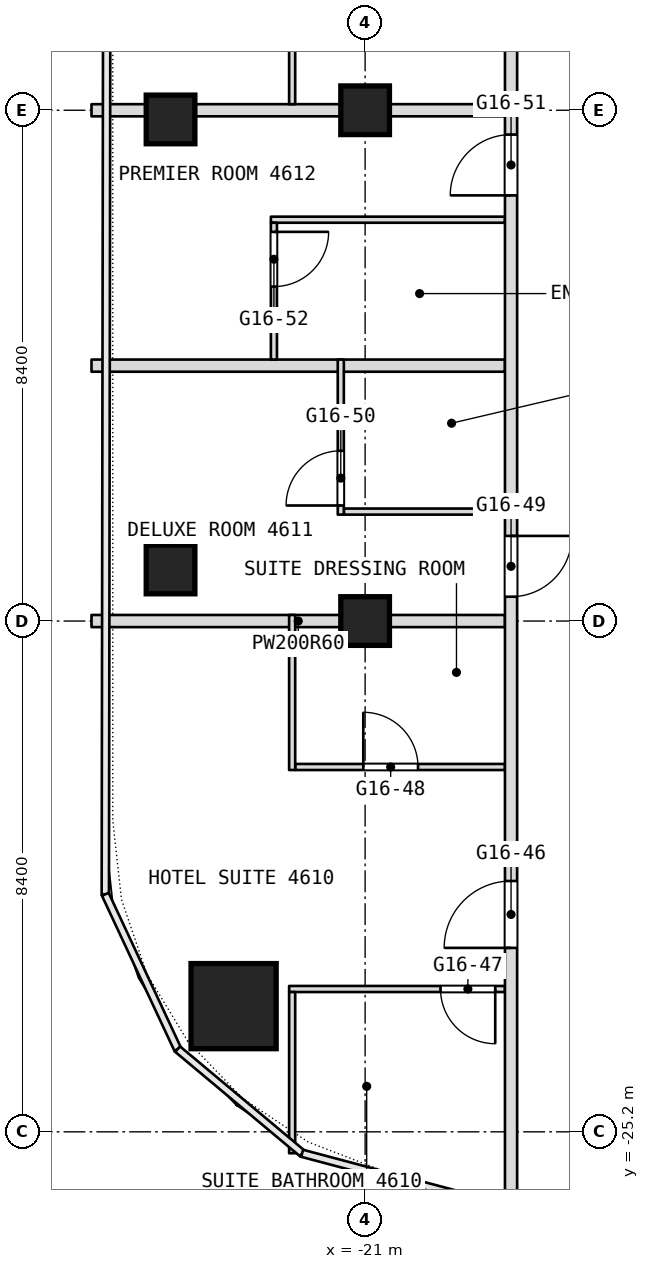
"""IFC4 building model, lengths in metres.
Left out: names, types, materials, properties, quantities, classifications, styles, units other than length and angle.
Written with IfcOpenShell. Run it as: python <this file> out.ifc"""

import sys

from ifc_helpers import new_model, si_unit, direction, frame, frame_2d, origin, origin_2d, place, context, subcontext, project, spatial, rectangle, extrude, element, fill, save


model = new_model("IFC4")
c1 = context("Model", 3, precision=1e-05, world=origin(), true_north=direction((0.0, 1.0)))
c2 = subcontext(c1, "Body", "Model", "MODEL_VIEW")
j1 = project(units=[si_unit("LENGTHUNIT", "METRE"), si_unit("PLANEANGLEUNIT", "RADIAN")], contexts=[c1])
p1 = place(None, origin())
s1 = spatial("IfcSite", under=j1, at=p1, CompositionType="ELEMENT")
p2 = place(p1, origin())
s2 = spatial("IfcBuilding", under=s1, at=p2, CompositionType="ELEMENT")
p3 = place(p2, frame((0.0, 0.0, 202.1)))
s3 = spatial("IfcBuildingStorey", under=s2, at=p3, CompositionType="ELEMENT", Elevation=202.1)
p4 = place(p3, frame((-23.163, -23.133, 0.0), z_axis=(0.0, 0.0, 1.0), x_axis=(1.0, 0.0, 0.0)))
e1 = element("IfcColumn", 1, at=p4, inside=s3, PredefinedType="COLUMN", context=c2, shape_type="SweptSolid", body=[
    extrude(rectangle(XDim=1.4, YDim=1.4, at=origin_2d()), origin(), (0.0, 0.0, 1.0), 3.6),
])
for number, where, z_axis, x_axis in (
    (2, (-21.0, -16.8, 0.0), (0.0, 0.0, 1.0), (1.0, 0.0, 0.0)),
    (3, (-21.0, -8.4, 0.0), (0.0, 0.0, 1.0), (1.0, 0.0, 0.0)),
    (4, (-24.2, -15.952, 0.0), (0.0, 0.0, 1.0), (1.0, 0.0, 0.0)),
    (5, (-24.2, -8.551, 0.0), (0.0, 0.0, 1.0), (1.0, 0.0, 0.0)),
):
    element("IfcColumn", number, at=place(p3, frame(where, z_axis=z_axis, x_axis=x_axis)), inside=s3, PredefinedType="COLUMN", context=c2, shape_type="SweptSolid", body=[
        extrude(rectangle(XDim=0.8, YDim=0.8, at=origin_2d()), origin(), (0.0, 0.0, 1.0), 3.6),
    ])
p5 = place(p3, frame((-22.25, -22.851, 0.0), z_axis=(0.0, 0.0, 1.0), x_axis=(1.0, 0.0, 0.0)))
e6 = element("IfcWall", 6, at=p5, inside=s3, PredefinedType="PARTITIONING", context=c2, shape_type="SweptSolid", body=[
    extrude(rectangle(XDim=3.55, YDim=0.1, at=frame_2d((1.775, 0.0))), origin(), (0.0, 0.0, 1.0), 3.34),
])
p6 = place(p5, frame((2.49, 0.0, 0.0)))
e7 = element("IfcOpeningElement", 7, at=p6, cuts=e6, PredefinedType="OPENING", context=c2, shape_type="SweptSolid", body=[
    extrude(rectangle(XDim=0.9, YDim=2.1, at=frame_2d((0.45, 1.05))), frame((0.0, 0.05, 0.0), z_axis=(0.0, -1.0, 0.0), x_axis=(1.0, 0.0, 0.0)), (0.0, 0.0, 1.0), 0.1),
])
p7 = place(p3, frame((-22.15, -19.2, 0.0), z_axis=(0.0, 0.0, 1.0), x_axis=(1.0, 0.0, 0.0)))
e8 = element("IfcWall", 8, at=p7, inside=s3, PredefinedType="PARTITIONING", context=c2, shape_type="SweptSolid", body=[
    extrude(rectangle(XDim=3.45, YDim=0.1, at=frame_2d((1.725, 0.0))), origin(), (0.0, 0.0, 1.0), 3.34),
])
p8 = place(p7, frame((1.12, 0.0, 0.0)))
e9 = element("IfcOpeningElement", 9, at=p8, cuts=e8, PredefinedType="OPENING", context=c2, shape_type="SweptSolid", body=[
    extrude(rectangle(XDim=0.9, YDim=2.1, at=frame_2d((0.45, 1.05))), frame((0.0, 0.05, 0.0), z_axis=(0.0, -1.0, 0.0), x_axis=(1.0, 0.0, 0.0)), (0.0, 0.0, 1.0), 0.1),
])
p9 = place(p3, frame((-25.5, -16.8, 0.0), z_axis=(0.0, 0.0, 1.0), x_axis=(1.0, 0.0, 0.0)))
e10 = element("IfcWall", 10, at=p9, inside=s3, PredefinedType="PARTITIONING", context=c2, shape_type="SweptSolid", body=[
    extrude(rectangle(XDim=6.8, YDim=0.2, at=frame_2d((3.4, 0.0))), origin(), (0.0, 0.0, 1.0), 2.94),
])
p10 = place(p3, frame((-21.35, -15.0, 0.0), z_axis=(0.0, 0.0, 1.0), x_axis=(1.0, 0.0, 0.0)))
e11 = element("IfcWall", 11, at=p10, inside=s3, PredefinedType="PARTITIONING", context=c2, shape_type="SweptSolid", body=[
    extrude(rectangle(XDim=2.65, YDim=0.1, at=frame_2d((1.325, 0.0))), origin(), (0.0, 0.0, 1.0), 3.34),
])
p11 = place(p3, frame((-25.5, -12.6, 0.0), z_axis=(0.0, 0.0, 1.0), x_axis=(1.0, 0.0, 0.0)))
e12 = element("IfcWall", 12, at=p11, inside=s3, PredefinedType="PARTITIONING", context=c2, shape_type="SweptSolid", body=[
    extrude(rectangle(XDim=6.8, YDim=0.2, at=frame_2d((3.4, 0.0))), origin(), (0.0, 0.0, 1.0), 3.34),
])
p12 = place(p3, frame((-22.55, -10.2, 0.0), z_axis=(0.0, 0.0, 1.0), x_axis=(1.0, 0.0, 0.0)))
e13 = element("IfcWall", 13, at=p12, inside=s3, PredefinedType="PARTITIONING", context=c2, shape_type="SweptSolid", body=[
    extrude(rectangle(XDim=3.85, YDim=0.1, at=frame_2d((1.925, 0.0))), origin(), (0.0, 0.0, 1.0), 3.34),
])
p13 = place(p3, frame((-25.5, -8.4, 0.0), z_axis=(0.0, 0.0, 1.0), x_axis=(1.0, 0.0, 0.0)))
e14 = element("IfcWall", 14, at=p13, inside=s3, PredefinedType="PARTITIONING", context=c2, shape_type="SweptSolid", body=[
    extrude(rectangle(XDim=6.8, YDim=0.2, at=frame_2d((3.4, 0.0))), origin(), (0.0, 0.0, 1.0), 2.94),
])
p14 = place(p3, frame((-18.6, -26.751, 0.0), z_axis=(0.0, 0.0, 1.0), x_axis=(0.0, 1.0, 0.0)))
e15 = element("IfcWall", 15, at=p14, inside=s3, PredefinedType="PARTITIONING", context=c2, shape_type="SweptSolid", body=[
    extrude(rectangle(XDim=49.091, YDim=0.2, at=frame_2d((24.545, 0.0))), origin(), (0.0, 0.0, 1.0), 3.34),
])
p15 = place(p14, frame((4.576, 0.0, 0.0)))
e16 = element("IfcOpeningElement", 16, at=p15, cuts=e15, PredefinedType="OPENING", context=c2, shape_type="SweptSolid", body=[
    extrude(rectangle(XDim=1.1, YDim=2.1, at=frame_2d((0.55, 1.05))), frame((0.0, 0.1, 0.0), z_axis=(0.0, -1.0, 0.0), x_axis=(1.0, 0.0, 0.0)), (0.0, 0.0, 1.0), 0.2),
])
p16 = place(p14, frame((10.351, 0.0, 0.0)))
e17 = element("IfcOpeningElement", 17, at=p16, cuts=e15, PredefinedType="OPENING", context=c2, shape_type="SweptSolid", body=[
    extrude(rectangle(XDim=1.0, YDim=2.1, at=frame_2d((0.5, 1.05))), frame((0.0, 0.1, 0.0), z_axis=(0.0, -1.0, 0.0), x_axis=(1.0, 0.0, 0.0)), (0.0, 0.0, 1.0), 0.2),
])
p17 = place(p14, frame((16.951, 0.0, 0.0)))
e18 = element("IfcOpeningElement", 18, at=p17, cuts=e15, PredefinedType="OPENING", context=c2, shape_type="SweptSolid", body=[
    extrude(rectangle(XDim=1.0, YDim=2.1, at=frame_2d((0.5, 1.05))), frame((0.0, 0.1, 0.0), z_axis=(0.0, -1.0, 0.0), x_axis=(1.0, 0.0, 0.0)), (0.0, 0.0, 1.0), 0.2),
])
p18 = place(p14, frame((22.051, 0.0, 0.0)))
e19 = element("IfcOpeningElement", 19, at=p18, cuts=e15, PredefinedType="OPENING", context=c2, shape_type="SweptSolid", body=[
    extrude(rectangle(XDim=1.1, YDim=2.1, at=frame_2d((0.55, 1.05))), frame((0.0, 0.1, 0.0), z_axis=(0.0, -1.0, 0.0), x_axis=(1.0, 0.0, 0.0)), (0.0, 0.0, 1.0), 0.2),
])
p19 = place(p14, frame((30.351, 0.0, 0.0)))
e20 = element("IfcOpeningElement", 20, at=p19, cuts=e15, PredefinedType="OPENING", context=c2, shape_type="SweptSolid", body=[
    extrude(rectangle(XDim=1.1, YDim=2.1, at=frame_2d((0.55, 1.05))), frame((0.0, 0.1, 0.0), z_axis=(0.0, -1.0, 0.0), x_axis=(1.0, 0.0, 0.0)), (0.0, 0.0, 1.0), 0.2),
])
p20 = place(p14, frame((40.901, 0.0, 0.0)))
e21 = element("IfcOpeningElement", 21, at=p20, cuts=e15, PredefinedType="OPENING", context=c2, shape_type="SweptSolid", body=[
    extrude(rectangle(XDim=1.1, YDim=2.1, at=frame_2d((0.55, 1.05))), frame((0.0, 0.1, 0.0), z_axis=(0.0, -1.0, 0.0), x_axis=(1.0, 0.0, 0.0)), (0.0, 0.0, 1.0), 0.2),
])
p21 = place(p14, frame((44.051, 0.0, 0.0)))
e22 = element("IfcOpeningElement", 22, at=p21, cuts=e15, PredefinedType="OPENING", context=c2, shape_type="SweptSolid", body=[
    extrude(rectangle(XDim=1.0, YDim=2.1, at=frame_2d((0.5, 1.05))), frame((0.0, 0.1, 0.0), z_axis=(0.0, -1.0, 0.0), x_axis=(1.0, 0.0, 0.0)), (0.0, 0.0, 1.0), 0.2),
])
p22 = place(p3, frame((-21.4, -15.05, 0.0), z_axis=(0.0, 0.0, 1.0), x_axis=(0.0, 1.0, 0.0)))
e23 = element("IfcWall", 23, at=p22, inside=s3, PredefinedType="PARTITIONING", context=c2, shape_type="SweptSolid", body=[
    extrude(rectangle(XDim=2.55, YDim=0.1, at=frame_2d((1.275, 0.0))), origin(), (0.0, 0.0, 1.0), 3.34),
])
p23 = place(p22, frame((0.15, 0.0, 0.0)))
e24 = element("IfcOpeningElement", 24, at=p23, cuts=e23, PredefinedType="OPENING", context=c2, shape_type="SweptSolid", body=[
    extrude(rectangle(XDim=0.9, YDim=2.1, at=frame_2d((0.45, 1.05))), frame((0.0, 0.05, 0.0), z_axis=(0.0, -1.0, 0.0), x_axis=(1.0, 0.0, 0.0)), (0.0, 0.0, 1.0), 0.1),
])
p24 = place(p3, frame((-22.2, -25.552, 0.0), z_axis=(0.0, 0.0, 1.0), x_axis=(0.0, 1.0, 0.0)))
e25 = element("IfcWall", 25, at=p24, inside=s3, PredefinedType="PARTITIONING", context=c2, shape_type="SweptSolid", body=[
    extrude(rectangle(XDim=2.651, YDim=0.1, at=frame_2d((1.326, 0.0))), origin(), (0.0, 0.0, 1.0), 3.34),
])
p25 = place(p3, frame((-22.2, -19.25, 0.0), z_axis=(0.0, 0.0, 1.0), x_axis=(0.0, 1.0, 0.0)))
e26 = element("IfcWall", 26, at=p25, inside=s3, PredefinedType="PARTITIONING", context=c2, shape_type="SweptSolid", body=[
    extrude(rectangle(XDim=2.55, YDim=0.1, at=frame_2d((1.275, 0.0))), origin(), (0.0, 0.0, 1.0), 3.34),
])
p26 = place(p3, frame((-22.2, -8.3, 0.0), z_axis=(0.0, 0.0, 1.0), x_axis=(0.0, 1.0, 0.0)))
e27 = element("IfcWall", 27, at=p26, inside=s3, PredefinedType="PARTITIONING", context=c2, shape_type="SweptSolid", body=[
    extrude(rectangle(XDim=3.45, YDim=0.1, at=frame_2d((1.725, 0.0))), origin(), (0.0, 0.0, 1.0), 3.34),
])
p27 = place(p26, frame((2.4, 0.0, 0.0)))
e28 = element("IfcOpeningElement", 28, at=p27, cuts=e27, PredefinedType="OPENING", context=c2, shape_type="SweptSolid", body=[
    extrude(rectangle(XDim=0.9, YDim=2.1, at=frame_2d((0.45, 1.05))), frame((0.0, 0.05, 0.0), z_axis=(0.0, -1.0, 0.0), x_axis=(1.0, 0.0, 0.0)), (0.0, 0.0, 1.0), 0.1),
])
p28 = place(p3, frame((-22.5, -12.5, 0.0), z_axis=(0.0, 0.0, 1.0), x_axis=(0.0, 1.0, 0.0)))
e29 = element("IfcWall", 29, at=p28, inside=s3, PredefinedType="PARTITIONING", context=c2, shape_type="SweptSolid", body=[
    extrude(rectangle(XDim=2.25, YDim=0.1, at=frame_2d((1.125, 0.0))), origin(), (0.0, 0.0, 1.0), 3.34),
])
p29 = place(p28, frame((1.2, 0.0, 0.0)))
e30 = element("IfcOpeningElement", 30, at=p29, cuts=e29, PredefinedType="OPENING", context=c2, shape_type="SweptSolid", body=[
    extrude(rectangle(XDim=0.9, YDim=2.1, at=frame_2d((0.45, 1.05))), frame((0.0, 0.05, 0.0), z_axis=(0.0, -1.0, 0.0), x_axis=(1.0, 0.0, 0.0)), (0.0, 0.0, 1.0), 0.1),
])
p30 = place(p6, origin())
e31 = element("IfcDoor", 31, at=p30, inside=s3, OperationType="SINGLE_SWING_LEFT", PredefinedType="DOOR", context=c2, shape_type="SweptSolid", body=[
    extrude(rectangle(XDim=0.9, YDim=2.1, at=frame_2d((0.45, 1.05))), frame((0.0, 0.025, 0.0), z_axis=(0.0, -1.0, 0.0), x_axis=(1.0, 0.0, 0.0)), (0.0, 0.0, 1.0), 0.05),
])
fill(e7, e31)
p31 = place(p8, origin())
e32 = element("IfcDoor", 32, at=p31, inside=s3, OperationType="SINGLE_SWING_LEFT", PredefinedType="DOOR", context=c2, shape_type="SweptSolid", body=[
    extrude(rectangle(XDim=0.9, YDim=2.1, at=frame_2d((0.45, 1.05))), frame((0.0, 0.025, 0.0), z_axis=(0.0, -1.0, 0.0), x_axis=(1.0, 0.0, 0.0)), (0.0, 0.0, 1.0), 0.05),
])
fill(e9, e32)
p32 = place(p15, origin())
e33 = element("IfcDoor", 33, at=p32, inside=s3, OperationType="SINGLE_SWING_LEFT", PredefinedType="DOOR", context=c2, shape_type="SweptSolid", body=[
    extrude(rectangle(XDim=1.1, YDim=2.1, at=frame_2d((0.55, 1.05))), frame((0.0, 0.025, 0.0), z_axis=(0.0, -1.0, 0.0), x_axis=(1.0, 0.0, 0.0)), (0.0, 0.0, 1.0), 0.05),
])
fill(e16, e33)
p33 = place(p16, origin())
e34 = element("IfcDoor", 34, at=p33, inside=s3, OperationType="SINGLE_SWING_RIGHT", PredefinedType="DOOR", context=c2, shape_type="SweptSolid", body=[
    extrude(rectangle(XDim=1.0, YDim=2.1, at=frame_2d((0.5, 1.05))), frame((0.0, 0.025, 0.0), z_axis=(0.0, -1.0, 0.0), x_axis=(1.0, 0.0, 0.0)), (0.0, 0.0, 1.0), 0.05),
])
fill(e17, e34)
p34 = place(p17, origin())
e35 = element("IfcDoor", 35, at=p34, inside=s3, OperationType="SINGLE_SWING_RIGHT", PredefinedType="DOOR", context=c2, shape_type="SweptSolid", body=[
    extrude(rectangle(XDim=1.0, YDim=2.1, at=frame_2d((0.5, 1.05))), frame((0.0, 0.025, 0.0), z_axis=(0.0, -1.0, 0.0), x_axis=(1.0, 0.0, 0.0)), (0.0, 0.0, 1.0), 0.05),
])
fill(e18, e35)
p35 = place(p23, origin())
e36 = element("IfcDoor", 36, at=p35, inside=s3, OperationType="SINGLE_SWING_RIGHT", PredefinedType="DOOR", context=c2, shape_type="SweptSolid", body=[
    extrude(rectangle(XDim=0.9, YDim=2.1, at=frame_2d((0.45, 1.05))), frame((0.0, 0.025, 0.0), z_axis=(0.0, -1.0, 0.0), x_axis=(1.0, 0.0, 0.0)), (0.0, 0.0, 1.0), 0.05),
])
fill(e24, e36)
p36 = place(p29, origin())
e37 = element("IfcDoor", 37, at=p36, inside=s3, OperationType="SINGLE_SWING_LEFT", PredefinedType="DOOR", context=c2, shape_type="SweptSolid", body=[
    extrude(rectangle(XDim=0.9, YDim=2.1, at=frame_2d((0.45, 1.05))), frame((0.0, 0.025, 0.0), z_axis=(0.0, -1.0, 0.0), x_axis=(1.0, 0.0, 0.0)), (0.0, 0.0, 1.0), 0.05),
])
fill(e30, e37)
save(model, sys.argv[1])
